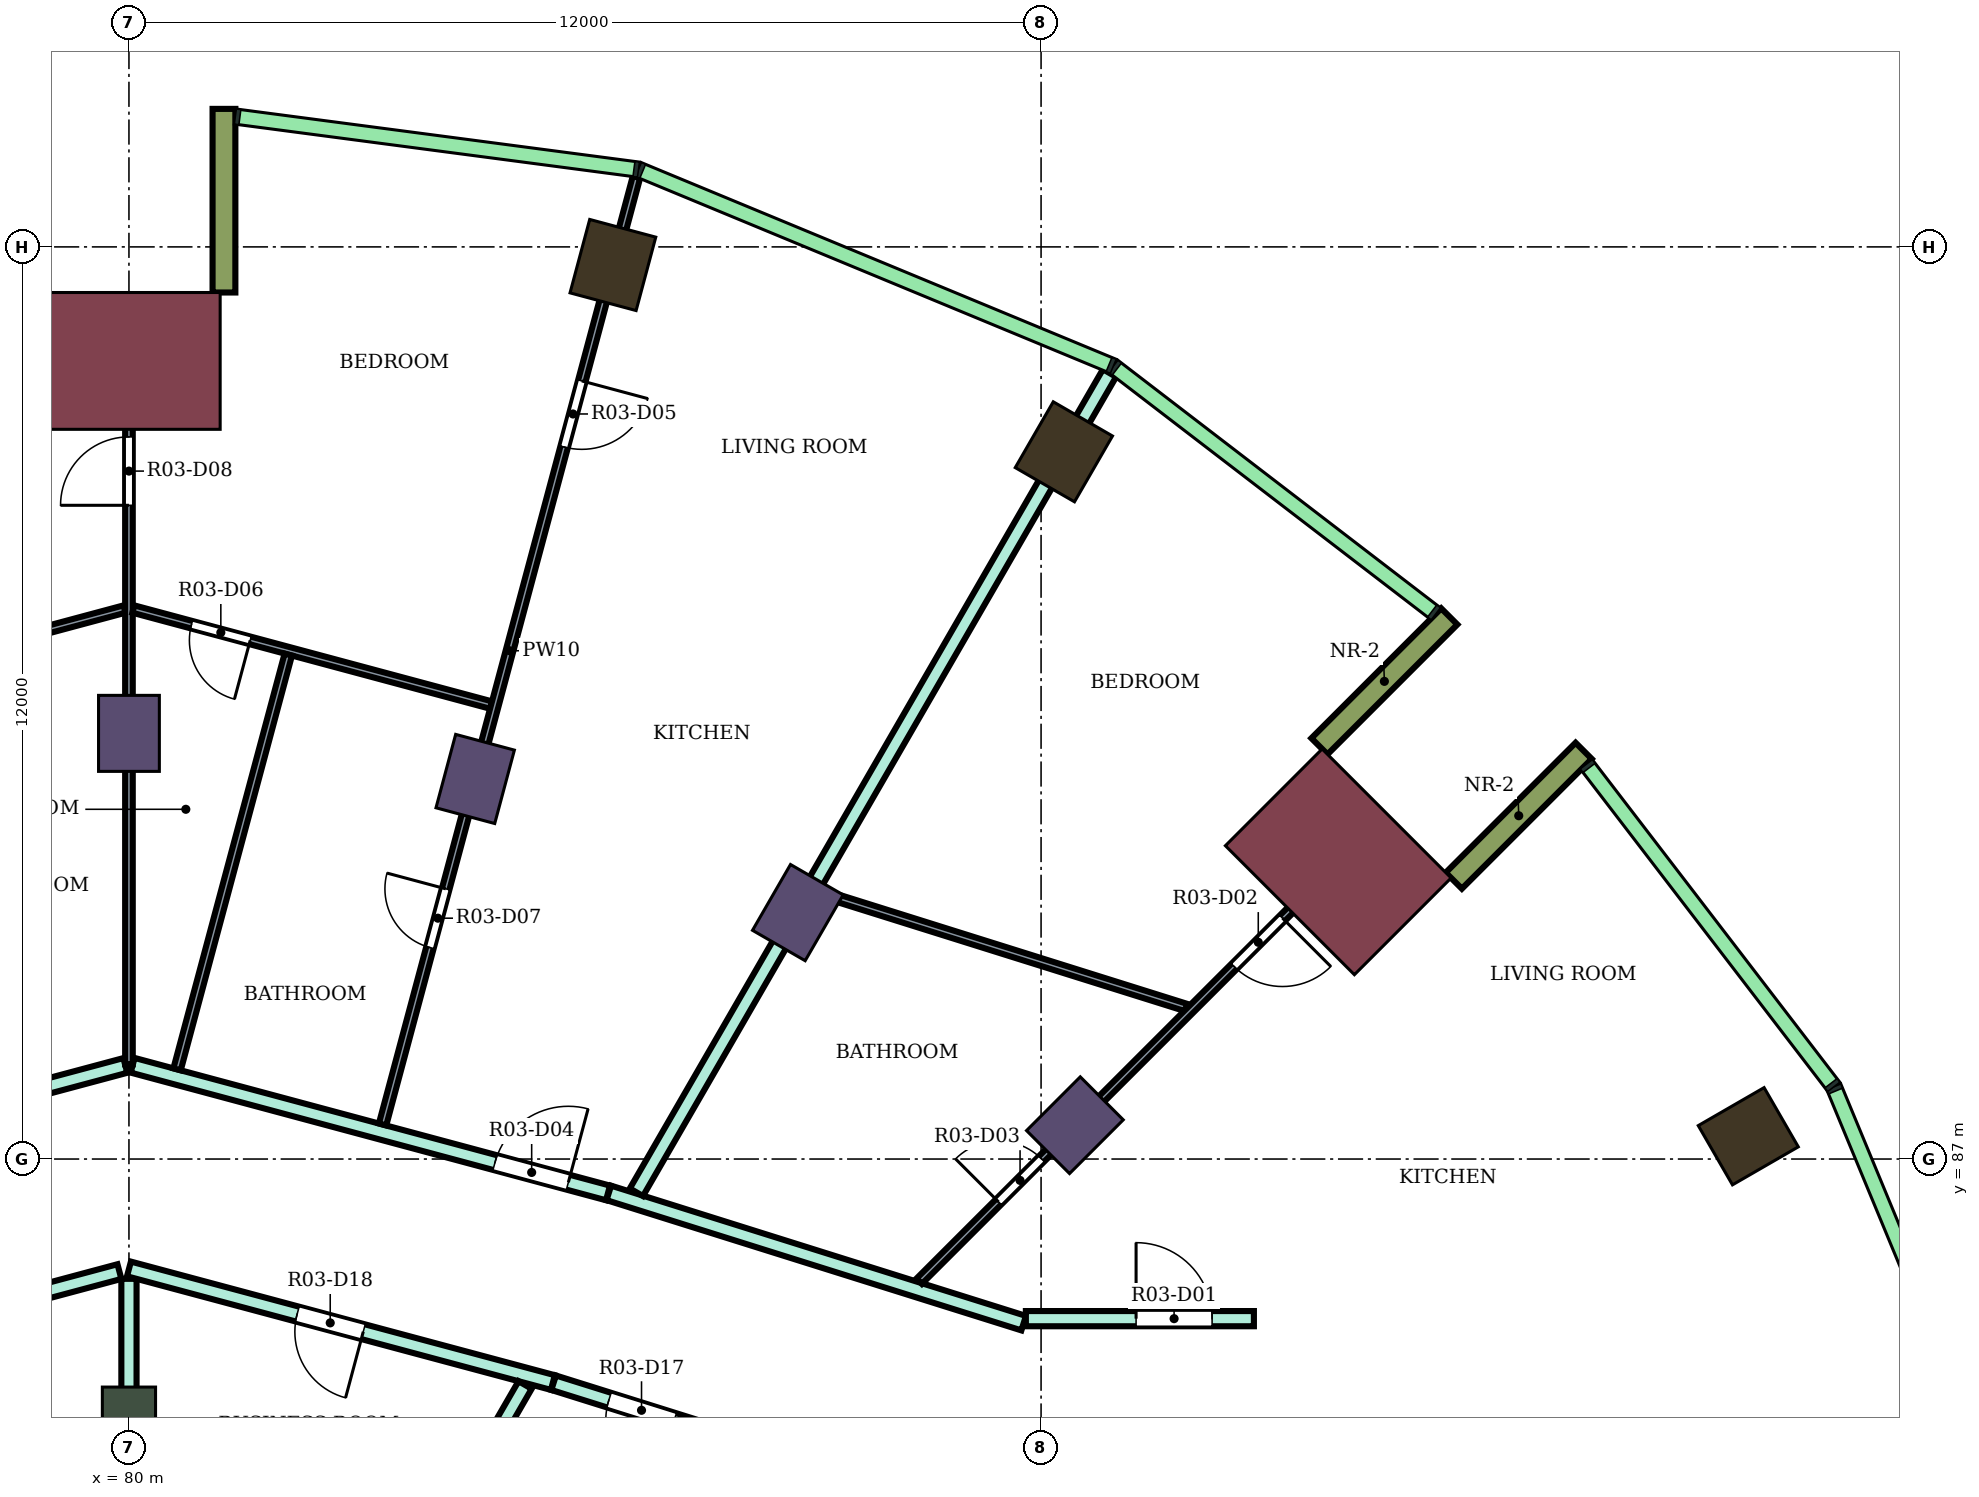
"""IFC4 building model, lengths in metres.
Left out: names, types, materials, properties, quantities, classifications, styles, units other than length and angle.
Written with IfcOpenShell. Run it as: python <this file> out.ifc"""

import sys

from ifc_helpers import new_model, si_unit, direction, frame, frame_2d, origin, origin_2d, place, context, subcontext, project, spatial, rectangle, extrude, element, fill, save


model = new_model("IFC4")
c1 = context("Model", 3, precision=1e-05, world=origin(), true_north=direction((0.0, 1.0)))
c2 = subcontext(c1, "Body", "Model", "MODEL_VIEW")
j1 = project(units=[si_unit("LENGTHUNIT", "METRE"), si_unit("PLANEANGLEUNIT", "RADIAN")], contexts=[c1])
p1 = place(None, origin())
s1 = spatial("IfcSite", under=j1, at=p1, CompositionType="ELEMENT")
p2 = place(p1, origin())
s2 = spatial("IfcBuilding", under=s1, at=p2, CompositionType="ELEMENT")
p3 = place(p2, frame((0.0, 0.0, 182.3)))
s3 = spatial("IfcBuildingStorey", under=s2, at=p3, CompositionType="ELEMENT", Elevation=182.3)
for number, where, z_axis, x_axis in (
    (1, (101.304, 87.3, 0.0), (0.0, 0.0, 1.0), (0.866, 0.5, 0.0)),
    (2, (92.3, 96.304, 0.0), (0.0, 0.0, 1.0), (0.5, 0.866, 0.0)),
    (3, (86.367, 98.762, 0.0), (0.0, 0.0, 1.0), (0.259, 0.966, 0.0)),
):
    element("IfcColumn", number, at=place(p3, frame(where, z_axis=z_axis, x_axis=x_axis)), inside=s3, PredefinedType="COLUMN", context=c2, shape_type="SweptSolid", body=[
        extrude(rectangle(XDim=1.0, YDim=0.9, at=origin_2d()), origin(), (0.0, 0.0, 1.0), 4.1),
    ])
for number, where, z_axis, x_axis in (
    (4, (92.445, 87.445, 0.0), (0.0, 0.0, 1.0), (0.707, 0.707, 0.0)),
    (5, (88.8, 90.242, 0.0), (0.0, 0.0, 1.0), (0.5, 0.866, 0.0)),
    (6, (84.555, 92.0, 0.0), (0.0, 0.0, 1.0), (0.259, 0.966, 0.0)),
    (7, (80.0, 92.6, 0.0), (0.0, 0.0, 1.0), (0.0, 1.0, 0.0)),
):
    element("IfcColumn", number, at=place(p3, frame(where, z_axis=z_axis, x_axis=x_axis)), inside=s3, PredefinedType="COLUMN", context=c2, shape_type="SweptSolid", body=[
        extrude(rectangle(XDim=1.0, YDim=0.8, at=origin_2d()), origin(), (0.0, 0.0, 1.0), 4.1),
    ])
p4 = place(p3, frame((80.0, 83.6, 0.0), z_axis=(0.0, 0.0, 1.0), x_axis=(0.0, 1.0, 0.0)))
e8 = element("IfcColumn", 8, at=p4, inside=s3, PredefinedType="COLUMN", context=c2, shape_type="SweptSolid", body=[
    extrude(rectangle(XDim=0.8, YDim=0.7, at=origin_2d()), origin(), (0.0, 0.0, 1.0), 4.1),
])
for number, where, z_axis, x_axis in (
    (9, (95.91, 90.91, 0.0), (0.0, 0.0, 1.0), (0.707, 0.707, 0.0)),
    (10, (80.0, 97.5, 0.0), (0.0, 0.0, 1.0), (0.0, 1.0, 0.0)),
):
    element("IfcColumn", number, at=place(p3, frame(where, z_axis=z_axis, x_axis=x_axis)), inside=s3, PredefinedType="COLUMN", context=c2, shape_type="SweptSolid", body=[
        extrude(rectangle(XDim=1.8, YDim=2.4, at=origin_2d()), origin(), (0.0, 0.0, 1.0), 4.1),
    ])
for number, where, z_axis, x_axis in (
    (11, (97.43, 90.662, 0.0), (0.0, 0.0, 1.0), (0.707, 0.707, 0.0)),
    (12, (95.662, 92.43, 0.0), (0.0, 0.0, 1.0), (0.707, 0.707, 0.0)),
    (13, (81.25, 98.4, 0.0), (0.0, 0.0, 1.0), (0.0, 1.0, 0.0)),
):
    element("IfcWall", number, at=place(p3, frame(where, z_axis=z_axis, x_axis=x_axis)), inside=s3, PredefinedType="NOTDEFINED", context=c2, shape_type="SweptSolid", body=[
        extrude(rectangle(XDim=2.416, YDim=0.3, at=frame_2d((1.208, 0.0))), origin(), (0.0, 0.0, 1.0), 4.1),
    ])
p5 = place(p3, frame((73.687, 86.554, 0.0), z_axis=(0.0, 0.0, 1.0), x_axis=(0.965992724769, 0.258569247387, 0.0)))
e14 = element("IfcWall", 14, at=p5, inside=s3, PredefinedType="PARTITIONING", context=c2, shape_type="SweptSolid", body=[
    extrude(rectangle(XDim=6.486, YDim=0.2, at=frame_2d((3.243, 0.0))), origin(), (0.0, 0.0, 1.0), 3.65),
])
p6 = place(p5, frame((0.214, 0.0, 0.0)))
e15 = element("IfcOpeningElement", 15, at=p6, cuts=e14, PredefinedType="OPENING", context=c2, shape_type="SweptSolid", body=[
    extrude(rectangle(XDim=1.0, YDim=2.1, at=frame_2d((0.5, 1.05))), frame((0.0, 0.11, 0.0), z_axis=(0.0, -1.0, 0.0), x_axis=(1.0, 0.0, 0.0)), (0.0, 0.0, 1.0), 0.22),
])
p7 = place(p3, frame((74.413, 84.057, 0.0), z_axis=(0.0, 0.0, 1.0), x_axis=(0.965972135939, 0.258646153246, 0.0)))
e16 = element("IfcWall", 16, at=p7, inside=s3, PredefinedType="PARTITIONING", context=c2, shape_type="SweptSolid", body=[
    extrude(rectangle(XDim=5.654, YDim=0.2, at=frame_2d((2.827, 0.0))), origin(), (0.0, 0.0, 1.0), 3.65),
])
p8 = place(p7, frame((2.593, 0.0, 0.0)))
e17 = element("IfcOpeningElement", 17, at=p8, cuts=e16, PredefinedType="OPENING", context=c2, shape_type="SweptSolid", body=[
    extrude(rectangle(XDim=0.9, YDim=2.1, at=frame_2d((0.45, 1.05))), frame((0.0, 0.11, 0.0), z_axis=(0.0, -1.0, 0.0), x_axis=(1.0, 0.0, 0.0)), (0.0, 0.0, 1.0), 0.22),
])
p9 = place(p3, frame((80.0, 82.699, 0.0), z_axis=(0.0, 0.0, 1.0), x_axis=(0.0, 1.0, 0.0)))
e18 = element("IfcWall", 18, at=p9, inside=s3, PredefinedType="PARTITIONING", context=c2, shape_type="SweptSolid", body=[
    extrude(rectangle(XDim=2.725, YDim=0.2, at=frame_2d((1.363, 0.0))), origin(), (0.0, 0.0, 1.0), 3.65),
])
p10 = place(p3, frame((80.0, 85.554, 0.0), z_axis=(0.0, 0.0, 1.0), x_axis=(0.965928989968, -0.258807237802, 0.0)))
e19 = element("IfcWall", 19, at=p10, inside=s3, PredefinedType="PARTITIONING", context=c2, shape_type="SweptSolid", body=[
    extrude(rectangle(XDim=5.774, YDim=0.2, at=frame_2d((2.887, 0.0))), origin(), (0.0, 0.0, 1.0), 3.65),
])
p11 = place(p10, frame((2.292, 0.0, 0.0)))
e20 = element("IfcOpeningElement", 20, at=p11, cuts=e19, PredefinedType="OPENING", context=c2, shape_type="SweptSolid", body=[
    extrude(rectangle(XDim=0.9, YDim=2.1, at=frame_2d((0.45, 1.05))), frame((0.0, 0.11, 0.0), z_axis=(0.0, -1.0, 0.0), x_axis=(1.0, 0.0, 0.0)), (0.0, 0.0, 1.0), 0.22),
])
p12 = place(p3, frame((80.048, 88.233, 0.0), z_axis=(0.0, 0.0, 1.0), x_axis=(0.965787353661, -0.259335280109, 0.0)))
e21 = element("IfcWall", 21, at=p12, inside=s3, PredefinedType="PARTITIONING", context=c2, shape_type="SweptSolid", body=[
    extrude(rectangle(XDim=6.476, YDim=0.2, at=frame_2d((3.238, 0.0))), origin(), (0.0, 0.0, 1.0), 3.65),
])
p13 = place(p12, frame((4.936, 0.0, 0.0)))
e22 = element("IfcOpeningElement", 22, at=p13, cuts=e21, PredefinedType="OPENING", context=c2, shape_type="SweptSolid", body=[
    extrude(rectangle(XDim=1.0, YDim=2.1, at=frame_2d((0.5, 1.05))), frame((0.0, 0.11, 0.0), z_axis=(0.0, -1.0, 0.0), x_axis=(1.0, 0.0, 0.0)), (0.0, 0.0, 1.0), 0.22),
])
p14 = place(p3, frame((83.849, 81.667, 0.0), z_axis=(0.0, 0.0, 1.0), x_axis=(0.500117899823, 0.865957323588, 0.0)))
e23 = element("IfcWall", 23, at=p14, inside=s3, PredefinedType="PARTITIONING", context=c2, shape_type="SweptSolid", body=[
    extrude(rectangle(XDim=2.725, YDim=0.2, at=frame_2d((1.363, 0.0))), origin(), (0.0, 0.0, 1.0), 3.65),
])
p15 = place(p3, frame((85.587, 84.057, 0.0), z_axis=(0.0, 0.0, 1.0), x_axis=(0.954239513179, -0.299043393987, 0.0)))
e24 = element("IfcWall", 24, at=p15, inside=s3, PredefinedType="PARTITIONING", context=c2, shape_type="SweptSolid", body=[
    extrude(rectangle(XDim=2.424, YDim=0.2, at=frame_2d((1.212, 0.0))), origin(), (0.0, 0.0, 1.0), 3.65),
])
p16 = place(p15, frame((0.762, 0.0, 0.0)))
e25 = element("IfcOpeningElement", 25, at=p16, cuts=e24, PredefinedType="OPENING", context=c2, shape_type="SweptSolid", body=[
    extrude(rectangle(XDim=0.9, YDim=2.1, at=frame_2d((0.45, 1.05))), frame((0.0, 0.11, 0.0), z_axis=(0.0, -1.0, 0.0), x_axis=(1.0, 0.0, 0.0)), (0.0, 0.0, 1.0), 0.22),
])
p17 = place(p3, frame((86.313, 86.554, 0.0), z_axis=(0.0, 0.0, 1.0), x_axis=(0.954081217458, -0.299548043717, 0.0)))
e26 = element("IfcWall", 26, at=p17, inside=s3, PredefinedType="PARTITIONING", context=c2, shape_type="SweptSolid", body=[
    extrude(rectangle(XDim=5.721, YDim=0.2, at=frame_2d((2.86, 0.0))), origin(), (0.0, 0.0, 1.0), 3.65),
])
p18 = place(p3, frame((86.676, 86.563, 0.0), z_axis=(0.0, 0.0, 1.0), x_axis=(0.500130524836, 0.865950032119, 0.0)))
e27 = element("IfcWall", 27, at=p18, inside=s3, PredefinedType="PARTITIONING", context=c2, shape_type="SweptSolid", body=[
    extrude(rectangle(XDim=12.446, YDim=0.2, at=frame_2d((6.223, 0.0))), origin(), (0.0, 0.0, 1.0), 3.65),
])
p19 = place(p3, frame((91.8, 84.9, 0.0), z_axis=(0.0, 0.0, 1.0), x_axis=(1.0, 0.0, 0.0)))
e28 = element("IfcWall", 28, at=p19, inside=s3, PredefinedType="PARTITIONING", context=c2, shape_type="SweptSolid", body=[
    extrude(rectangle(XDim=3.0, YDim=0.2, at=frame_2d((1.5, 0.0))), origin(), (0.0, 0.0, 1.0), 3.65),
])
p20 = place(p19, frame((1.45, 0.0, 0.0)))
e29 = element("IfcOpeningElement", 29, at=p20, cuts=e28, PredefinedType="OPENING", context=c2, shape_type="SweptSolid", body=[
    extrude(rectangle(XDim=1.0, YDim=2.1, at=frame_2d((0.5, 1.05))), frame((0.0, 0.11, 0.0), z_axis=(0.0, -1.0, 0.0), x_axis=(1.0, 0.0, 0.0)), (0.0, 0.0, 1.0), 0.22),
])
p21 = place(p3, frame((75.295, 92.989, 0.0), z_axis=(0.0, 0.0, 1.0), x_axis=(0.965829517501, 0.259178207271, 0.0)))
e30 = element("IfcWall", 30, at=p21, inside=s3, PredefinedType="PARTITIONING", context=c2, shape_type="SweptSolid", body=[
    extrude(rectangle(XDim=4.812, YDim=0.1, at=frame_2d((2.406, 0.0))), origin(), (0.0, 0.0, 1.0), 3.65),
])
p22 = place(p21, frame((1.981, 0.0, 0.0)))
e31 = element("IfcOpeningElement", 31, at=p22, cuts=e30, PredefinedType="OPENING", context=c2, shape_type="SweptSolid", body=[
    extrude(rectangle(XDim=0.8, YDim=2.1, at=frame_2d((0.4, 1.05))), frame((0.0, 0.06, 0.0), z_axis=(0.0, -1.0, 0.0), x_axis=(1.0, 0.0, 0.0)), (0.0, 0.0, 1.0), 0.12),
])
p23 = place(p3, frame((80.0, 88.246, 0.0), z_axis=(0.0, 0.0, 1.0), x_axis=(0.0, 1.0, 0.0)))
e32 = element("IfcWall", 32, at=p23, inside=s3, PredefinedType="PARTITIONING", context=c2, shape_type="SweptSolid", body=[
    extrude(rectangle(XDim=9.954, YDim=0.1, at=frame_2d((4.977, 0.0))), origin(), (0.0, 0.0, 1.0), 3.65),
])
p24 = place(p23, frame((7.354, 0.0, 0.0)))
e33 = element("IfcOpeningElement", 33, at=p24, cuts=e32, PredefinedType="OPENING", context=c2, shape_type="SweptSolid", body=[
    extrude(rectangle(XDim=0.9, YDim=2.1, at=frame_2d((0.45, 1.05))), frame((0.0, 0.06, 0.0), z_axis=(0.0, -1.0, 0.0), x_axis=(1.0, 0.0, 0.0)), (0.0, 0.0, 1.0), 0.12),
])
p25 = place(p3, frame((80.058, 94.235, 0.0), z_axis=(0.0, 0.0, 1.0), x_axis=(0.965831212389, -0.259171891173, 0.0)))
e34 = element("IfcWall", 34, at=p25, inside=s3, PredefinedType="PARTITIONING", context=c2, shape_type="SweptSolid", body=[
    extrude(rectangle(XDim=4.872, YDim=0.1, at=frame_2d((2.436, 0.0))), origin(), (0.0, 0.0, 1.0), 3.65),
])
p26 = place(p25, frame((0.792, 0.0, 0.0)))
e35 = element("IfcOpeningElement", 35, at=p26, cuts=e34, PredefinedType="OPENING", context=c2, shape_type="SweptSolid", body=[
    extrude(rectangle(XDim=0.8, YDim=2.1, at=frame_2d((0.4, 1.05))), frame((0.0, 0.06, 0.0), z_axis=(0.0, -1.0, 0.0), x_axis=(1.0, 0.0, 0.0)), (0.0, 0.0, 1.0), 0.12),
])
p27 = place(p3, frame((80.633, 88.18, 0.0), z_axis=(0.0, 0.0, 1.0), x_axis=(0.25898304477, 0.965881867788, 0.0)))
e36 = element("IfcWall", 36, at=p27, inside=s3, PredefinedType="PARTITIONING", context=c2, shape_type="SweptSolid", body=[
    extrude(rectangle(XDim=5.65, YDim=0.1, at=frame_2d((2.825, 0.0))), origin(), (0.0, 0.0, 1.0), 3.65),
])
p28 = place(p3, frame((83.337, 87.455, 0.0), z_axis=(0.0, 0.0, 1.0), x_axis=(0.258861232071, 0.965914521337, 0.0)))
e37 = element("IfcWall", 37, at=p28, inside=s3, PredefinedType="PARTITIONING", context=c2, shape_type="SweptSolid", body=[
    extrude(rectangle(XDim=12.904, YDim=0.1, at=frame_2d((6.452, 0.0))), origin(), (0.0, 0.0, 1.0), 3.65),
])
p29 = place(p28, frame((9.227, 0.0, 0.0)))
e38 = element("IfcOpeningElement", 38, at=p29, cuts=e37, PredefinedType="OPENING", context=c2, shape_type="SweptSolid", body=[
    extrude(rectangle(XDim=0.9, YDim=2.1, at=frame_2d((0.45, 1.05))), frame((0.0, 0.06, 0.0), z_axis=(0.0, -1.0, 0.0), x_axis=(1.0, 0.0, 0.0)), (0.0, 0.0, 1.0), 0.12),
])
p30 = place(p28, frame((2.409, 0.0, 0.0)))
e39 = element("IfcOpeningElement", 39, at=p30, cuts=e37, PredefinedType="OPENING", context=c2, shape_type="SweptSolid", body=[
    extrude(rectangle(XDim=0.8, YDim=2.1, at=frame_2d((0.4, 1.05))), frame((0.0, 0.06, 0.0), z_axis=(0.0, -1.0, 0.0), x_axis=(1.0, 0.0, 0.0)), (0.0, 0.0, 1.0), 0.12),
])
p31 = place(p3, frame((89.078, 90.508, 0.0), z_axis=(0.0, 0.0, 1.0), x_axis=(0.954199699612, -0.299170408398, 0.0)))
e40 = element("IfcWall", 40, at=p31, inside=s3, PredefinedType="PARTITIONING", context=c2, shape_type="SweptSolid", body=[
    extrude(rectangle(XDim=5.06, YDim=0.1, at=frame_2d((2.53, 0.0))), origin(), (0.0, 0.0, 1.0), 3.65),
])
p32 = place(p3, frame((90.397, 85.393, 0.0), z_axis=(0.0, 0.0, 1.0), x_axis=(0.707264750546, 0.706948776529, 0.0)))
e41 = element("IfcWall", 41, at=p32, inside=s3, PredefinedType="PARTITIONING", context=c2, shape_type="SweptSolid", body=[
    extrude(rectangle(XDim=8.499, YDim=0.1, at=frame_2d((4.25, 0.0))), origin(), (0.0, 0.0, 1.0), 3.65),
])
p33 = place(p32, frame((5.857, 0.0, 0.0)))
e42 = element("IfcOpeningElement", 42, at=p33, cuts=e41, PredefinedType="OPENING", context=c2, shape_type="SweptSolid", body=[
    extrude(rectangle(XDim=0.9, YDim=2.1, at=frame_2d((0.45, 1.05))), frame((0.0, 0.06, 0.0), z_axis=(0.0, -1.0, 0.0), x_axis=(1.0, 0.0, 0.0)), (0.0, 0.0, 1.0), 0.12),
])
p34 = place(p32, frame((1.476, 0.0, 0.0)))
e43 = element("IfcOpeningElement", 43, at=p34, cuts=e41, PredefinedType="OPENING", context=c2, shape_type="SweptSolid", body=[
    extrude(rectangle(XDim=0.8, YDim=2.1, at=frame_2d((0.4, 1.05))), frame((0.0, 0.06, 0.0), z_axis=(0.0, -1.0, 0.0), x_axis=(1.0, 0.0, 0.0)), (0.0, 0.0, 1.0), 0.12),
])
p35 = place(p20, origin())
e44 = element("IfcDoor", 44, at=p35, inside=s3, OperationType="SINGLE_SWING_LEFT", PredefinedType="DOOR", context=c2, shape_type="SweptSolid", body=[
    extrude(rectangle(XDim=1.0, YDim=2.1, at=frame_2d((0.5, 1.05))), frame((0.0, 0.025, 0.0), z_axis=(0.0, -1.0, 0.0), x_axis=(1.0, 0.0, 0.0)), (0.0, 0.0, 1.0), 0.05),
])
fill(e29, e44)
p36 = place(p33, frame((0.9, 0.0, 0.0), z_axis=(0.0, 0.0, 1.0), x_axis=(-1.0, 0.0, 0.0)))
e45 = element("IfcDoor", 45, at=p36, inside=s3, OperationType="SINGLE_SWING_LEFT", PredefinedType="DOOR", context=c2, shape_type="SweptSolid", body=[
    extrude(rectangle(XDim=0.9, YDim=2.1, at=frame_2d((0.45, 1.05))), frame((0.0, 0.025, 0.0), z_axis=(0.0, -1.0, 0.0), x_axis=(1.0, 0.0, 0.0)), (0.0, 0.0, 1.0), 0.05),
])
fill(e42, e45)
p37 = place(p34, origin())
e46 = element("IfcDoor", 46, at=p37, inside=s3, OperationType="SINGLE_SWING_LEFT", PredefinedType="DOOR", context=c2, shape_type="SweptSolid", body=[
    extrude(rectangle(XDim=0.8, YDim=2.1, at=frame_2d((0.4, 1.05))), frame((0.0, 0.025, 0.0), z_axis=(0.0, -1.0, 0.0), x_axis=(1.0, 0.0, 0.0)), (0.0, 0.0, 1.0), 0.05),
])
fill(e43, e46)
p38 = place(p13, origin())
e47 = element("IfcDoor", 47, at=p38, inside=s3, OperationType="SINGLE_SWING_RIGHT", PredefinedType="DOOR", context=c2, shape_type="SweptSolid", body=[
    extrude(rectangle(XDim=1.0, YDim=2.1, at=frame_2d((0.5, 1.05))), frame((0.0, 0.025, 0.0), z_axis=(0.0, -1.0, 0.0), x_axis=(1.0, 0.0, 0.0)), (0.0, 0.0, 1.0), 0.05),
])
fill(e22, e47)
p39 = place(p29, frame((0.9, 0.0, 0.0), z_axis=(0.0, 0.0, 1.0), x_axis=(-1.0, 0.0, 0.0)))
e48 = element("IfcDoor", 48, at=p39, inside=s3, OperationType="SINGLE_SWING_LEFT", PredefinedType="DOOR", context=c2, shape_type="SweptSolid", body=[
    extrude(rectangle(XDim=0.9, YDim=2.1, at=frame_2d((0.45, 1.05))), frame((0.0, 0.025, 0.0), z_axis=(0.0, -1.0, 0.0), x_axis=(1.0, 0.0, 0.0)), (0.0, 0.0, 1.0), 0.05),
])
fill(e38, e48)
p40 = place(p26, frame((0.8, 0.0, 0.0), z_axis=(0.0, 0.0, 1.0), x_axis=(-1.0, 0.0, 0.0)))
e49 = element("IfcDoor", 49, at=p40, inside=s3, OperationType="SINGLE_SWING_LEFT", PredefinedType="DOOR", context=c2, shape_type="SweptSolid", body=[
    extrude(rectangle(XDim=0.8, YDim=2.1, at=frame_2d((0.4, 1.05))), frame((0.0, 0.025, 0.0), z_axis=(0.0, -1.0, 0.0), x_axis=(1.0, 0.0, 0.0)), (0.0, 0.0, 1.0), 0.05),
])
fill(e35, e49)
p41 = place(p30, origin())
e50 = element("IfcDoor", 50, at=p41, inside=s3, OperationType="SINGLE_SWING_RIGHT", PredefinedType="DOOR", context=c2, shape_type="SweptSolid", body=[
    extrude(rectangle(XDim=0.8, YDim=2.1, at=frame_2d((0.4, 1.05))), frame((0.0, 0.025, 0.0), z_axis=(0.0, -1.0, 0.0), x_axis=(1.0, 0.0, 0.0)), (0.0, 0.0, 1.0), 0.05),
])
fill(e39, e50)
p42 = place(p24, origin())
e51 = element("IfcDoor", 51, at=p42, inside=s3, OperationType="SINGLE_SWING_LEFT", PredefinedType="DOOR", context=c2, shape_type="SweptSolid", body=[
    extrude(rectangle(XDim=0.9, YDim=2.1, at=frame_2d((0.45, 1.05))), frame((0.0, 0.025, 0.0), z_axis=(0.0, -1.0, 0.0), x_axis=(1.0, 0.0, 0.0)), (0.0, 0.0, 1.0), 0.05),
])
fill(e33, e51)
p43 = place(p16, frame((0.9, 0.0, 0.0), z_axis=(0.0, 0.0, 1.0), x_axis=(-1.0, 0.0, 0.0)))
e52 = element("IfcDoor", 52, at=p43, inside=s3, OperationType="SINGLE_SWING_LEFT", PredefinedType="DOOR", context=c2, shape_type="SweptSolid", body=[
    extrude(rectangle(XDim=0.9, YDim=2.1, at=frame_2d((0.45, 1.05))), frame((0.0, 0.025, 0.0), z_axis=(0.0, -1.0, 0.0), x_axis=(1.0, 0.0, 0.0)), (0.0, 0.0, 1.0), 0.05),
])
fill(e25, e52)
p44 = place(p11, frame((0.9, 0.0, 0.0), z_axis=(0.0, 0.0, 1.0), x_axis=(-1.0, 0.0, 0.0)))
e53 = element("IfcDoor", 53, at=p44, inside=s3, OperationType="SINGLE_SWING_LEFT", PredefinedType="DOOR", context=c2, shape_type="SweptSolid", body=[
    extrude(rectangle(XDim=0.9, YDim=2.1, at=frame_2d((0.45, 1.05))), frame((0.0, 0.025, 0.0), z_axis=(0.0, -1.0, 0.0), x_axis=(1.0, 0.0, 0.0)), (0.0, 0.0, 1.0), 0.05),
])
fill(e20, e53)
save(model, sys.argv[1])
